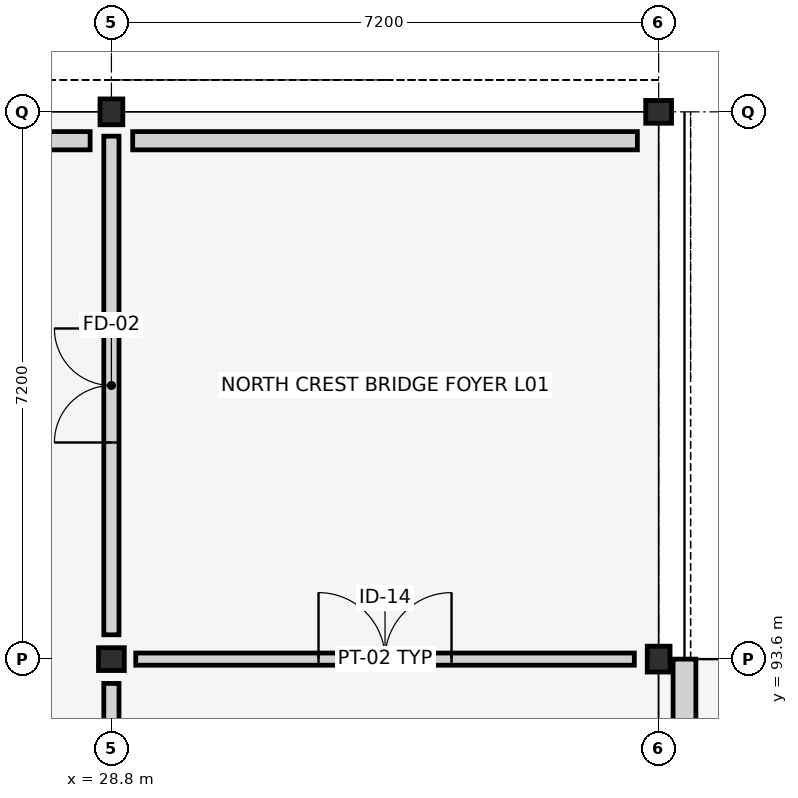
"""IFC4 building model, lengths in metres.
Left out: names, types, materials, properties, quantities, classifications, styles, units other than length and angle.
Written with IfcOpenShell. Run it as: python <this file> out.ifc"""

import sys

from ifc_helpers import new_model, si_unit, direction, frame, frame_2d, origin, origin_2d, place, context, subcontext, project, spatial, rectangle, i_section, extrude, element, fill, save


model = new_model("IFC4")
c1 = context("Model", 3, precision=1e-05, world=origin(), true_north=direction((0.0, 1.0)))
c2 = subcontext(c1, "Body", "Model", "MODEL_VIEW")
j1 = project(units=[si_unit("LENGTHUNIT", "METRE"), si_unit("PLANEANGLEUNIT", "RADIAN")], contexts=[c1])
p1 = place(None, origin())
s1 = spatial("IfcSite", under=j1, at=p1, CompositionType="ELEMENT")
p2 = place(p1, origin())
s2 = spatial("IfcBuilding", under=s1, at=p2, CompositionType="ELEMENT")
p3 = place(p2, frame((0.0, 0.0, 4.5)))
s3 = spatial("IfcBuildingStorey", under=s2, at=p3, CompositionType="ELEMENT", Elevation=4.5)
for number, where, z_axis, x_axis in (
    (1, (28.8, 93.6, 0.0), (0.0, 0.0, 1.0), (0.0, 1.0, 0.0)),
    (2, (28.8, 100.8, 0.0), (0.0, 0.0, 1.0), (1.0, 0.0, 0.0)),
    (3, (36.0, 93.6, 0.0), (0.0, 0.0, 1.0), (1.0, 0.0, 0.0)),
    (4, (36.0, 100.8, 0.0), (0.0, 0.0, 1.0), (0.0, 1.0, 0.0)),
):
    element("IfcColumn", number, at=place(p3, frame(where, z_axis=z_axis, x_axis=x_axis)), inside=s3, PredefinedType="COLUMN", context=c2, shape_type="SweptSolid", body=[
        extrude(i_section(OverallWidth=0.3, OverallDepth=0.34, WebThickness=0.012, FlangeThickness=0.021, FilletRadius=0.027, at=origin_2d()), origin(), (0.0, 0.0, 1.0), 4.2),
    ])
p4 = place(p3, frame((36.34, 86.4, 0.0), z_axis=(0.0, 0.0, 1.0), x_axis=(0.0, 1.0, 0.0)))
e5 = element("IfcWall", 5, at=p4, inside=s3, PredefinedType="STANDARD", context=c2, shape_type="SweptSolid", body=[
    extrude(rectangle(XDim=7.2, YDim=0.3, at=frame_2d((3.6, 0.0))), origin(), (0.0, 0.0, 1.0), 3.65),
])
p5 = place(p4, frame((2.65, 0.0, 0.0)))
e6 = element("IfcOpeningElement", 6, at=p5, cuts=e5, PredefinedType="OPENING", context=c2, shape_type="SweptSolid", body=[
    extrude(rectangle(XDim=1.9, YDim=2.45, at=frame_2d((0.95, 1.225))), frame((0.0, 0.16, 0.0), z_axis=(0.0, -1.0, 0.0), x_axis=(1.0, 0.0, 0.0)), (0.0, 0.0, 1.0), 0.32),
])
p6 = place(p3, frame((35.72, 100.42, 0.0), z_axis=(0.0, 0.0, 1.0), x_axis=(-1.0, 0.0, 0.0)))
e7 = element("IfcWall", 7, at=p6, inside=s3, PredefinedType="STANDARD", context=c2, shape_type="SweptSolid", body=[
    extrude(rectangle(XDim=6.64, YDim=0.24, at=frame_2d((3.32, 0.0))), origin(), (0.0, 0.0, 1.0), 3.58),
])
p7 = place(p3, frame((28.52, 100.42, 0.0), z_axis=(0.0, 0.0, 1.0), x_axis=(-1.0, 0.0, 0.0)))
e8 = element("IfcWall", 8, at=p7, inside=s3, PredefinedType="STANDARD", context=c2, shape_type="SweptSolid", body=[
    extrude(rectangle(XDim=6.64, YDim=0.24, at=frame_2d((3.32, 0.0))), origin(), (0.0, 0.0, 1.0), 3.58),
])
p8 = place(p3, frame((28.8, 72.32, 0.0), z_axis=(0.0, 0.0, 1.0), x_axis=(0.0, 1.0, 0.0)))
e9 = element("IfcWall", 9, at=p8, inside=s3, PredefinedType="PARTITIONING", context=c2, shape_type="SweptSolid", body=[
    extrude(rectangle(XDim=20.96, YDim=0.2, at=frame_2d((10.48, 0.0))), origin(), (0.0, 0.0, 1.0), 3.15),
])
p9 = place(p8, frame((9.68, 0.0, 0.0)))
e10 = element("IfcOpeningElement", 10, at=p9, cuts=e9, PredefinedType="OPENING", context=c2, shape_type="SweptSolid", body=[
    extrude(rectangle(XDim=1.6, YDim=2.35, at=frame_2d((0.8, 1.175))), frame((0.0, 0.11, 0.0), z_axis=(0.0, -1.0, 0.0), x_axis=(1.0, 0.0, 0.0)), (0.0, 0.0, 1.0), 0.22),
])
p10 = place(p3, frame((28.8, 93.92, 0.0), z_axis=(0.0, 0.0, 1.0), x_axis=(0.0, 1.0, 0.0)))
e11 = element("IfcWall", 11, at=p10, inside=s3, PredefinedType="PARTITIONING", context=c2, shape_type="SweptSolid", body=[
    extrude(rectangle(XDim=6.56, YDim=0.2, at=frame_2d((3.28, 0.0))), origin(), (0.0, 0.0, 1.0), 3.15),
])
p11 = place(p10, frame((2.53, 0.0, 0.0)))
e12 = element("IfcOpeningElement", 12, at=p11, cuts=e11, PredefinedType="OPENING", context=c2, shape_type="SweptSolid", body=[
    extrude(rectangle(XDim=1.5, YDim=2.25, at=frame_2d((0.75, 1.125))), frame((0.0, 0.11, 0.0), z_axis=(0.0, -1.0, 0.0), x_axis=(1.0, 0.0, 0.0)), (0.0, 0.0, 1.0), 0.22),
])
p12 = place(p3, frame((29.12, 93.6, 0.0), z_axis=(0.0, 0.0, 1.0), x_axis=(1.0, 0.0, 0.0)))
e13 = element("IfcWall", 13, at=p12, inside=s3, PredefinedType="PARTITIONING", context=c2, shape_type="SweptSolid", body=[
    extrude(rectangle(XDim=6.56, YDim=0.16, at=frame_2d((3.28, 0.0))), origin(), (0.0, 0.0, 1.0), 3.15),
])
p13 = place(p12, frame((2.405, 0.0, 0.0)))
e14 = element("IfcOpeningElement", 14, at=p13, cuts=e13, PredefinedType="OPENING", context=c2, shape_type="SweptSolid", body=[
    extrude(rectangle(XDim=1.75, YDim=2.45, at=frame_2d((0.875, 1.225))), frame((0.0, 0.09, 0.0), z_axis=(0.0, -1.0, 0.0), x_axis=(1.0, 0.0, 0.0)), (0.0, 0.0, 1.0), 0.18),
])
p14 = place(p11, origin())
e15 = element("IfcDoor", 15, at=p14, inside=s3, OperationType="DOUBLE_DOOR_SINGLE_SWING", PredefinedType="DOOR", context=c2, shape_type="SweptSolid", body=[
    extrude(rectangle(XDim=1.5, YDim=2.25, at=frame_2d((0.75, 1.125))), frame((0.0, 0.025, 0.0), z_axis=(0.0, -1.0, 0.0), x_axis=(1.0, 0.0, 0.0)), (0.0, 0.0, 1.0), 0.05),
])
fill(e12, e15)
p15 = place(p13, origin())
e16 = element("IfcDoor", 16, at=p15, inside=s3, OperationType="DOUBLE_DOOR_SINGLE_SWING", PredefinedType="DOOR", context=c2, shape_type="SweptSolid", body=[
    extrude(rectangle(XDim=1.75, YDim=2.45, at=frame_2d((0.875, 1.225))), frame((0.0, 0.025, 0.0), z_axis=(0.0, -1.0, 0.0), x_axis=(1.0, 0.0, 0.0)), (0.0, 0.0, 1.0), 0.05),
])
fill(e14, e16)
save(model, sys.argv[1])
